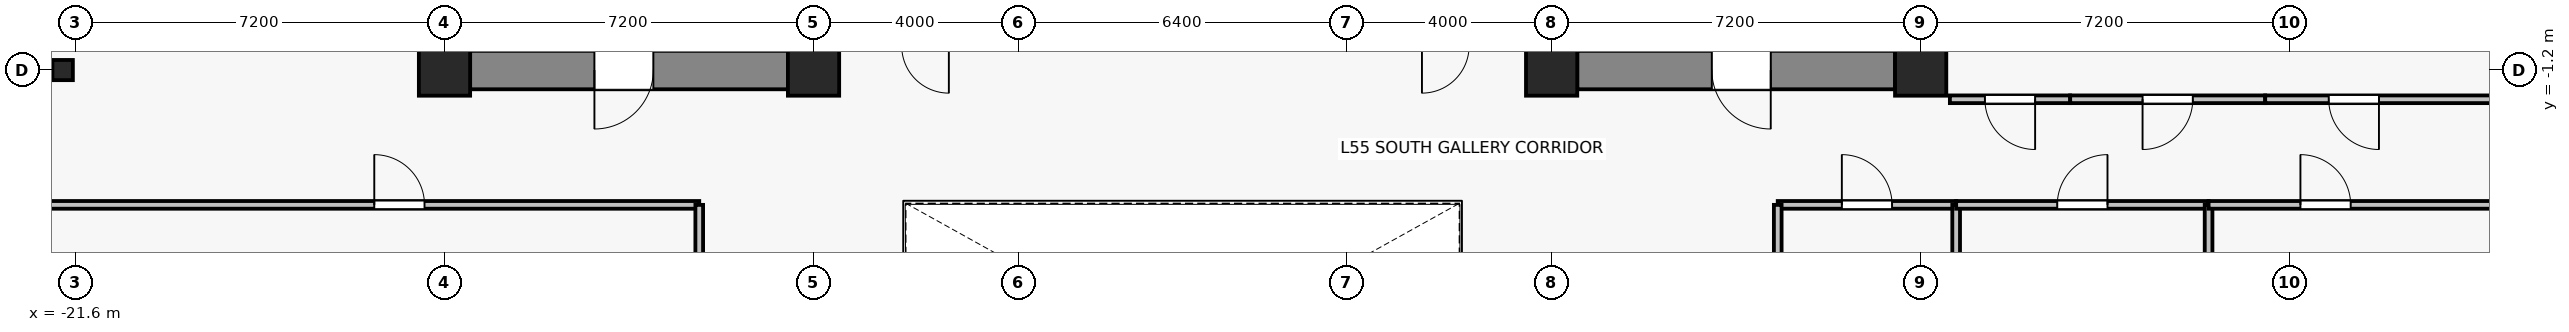
"""IFC4 building model, lengths in metres.
Left out: names, types, materials, properties, quantities, classifications, styles, units other than length and angle.
Written with IfcOpenShell. Run it as: python <this file> out.ifc"""

import sys

from ifc_helpers import new_model, si_unit, direction, frame, frame_2d, origin, origin_2d, place, context, subcontext, project, spatial, rectangle, i_section, extrude, source, transform, mapped, element, fill, save


model = new_model("IFC4")
c1 = context("Model", 3, precision=1e-05, world=origin(), true_north=direction((0.0, 1.0)))
c2 = subcontext(c1, "Body", "Model", "MODEL_VIEW")
j1 = project(units=[si_unit("LENGTHUNIT", "METRE"), si_unit("PLANEANGLEUNIT", "RADIAN")], contexts=[c1])
p1 = place(None, origin())
s1 = spatial("IfcSite", under=j1, at=p1, CompositionType="ELEMENT")
p2 = place(p1, origin())
s2 = spatial("IfcBuilding", under=s1, at=p2, CompositionType="ELEMENT")
p3 = place(p2, frame((0.0, 0.0, 195.7)))
s3 = spatial("IfcBuildingStorey", under=s2, at=p3, CompositionType="ELEMENT", Elevation=195.7)
for number, where, z_axis, x_axis in (
    (1, (-14.4, -1.2, 0.0), (0.0, 0.0, 1.0), (1.0, 0.0, 0.0)),
    (2, (-7.2, -1.2, 0.0), (0.0, 0.0, 1.0), (1.0, 0.0, 0.0)),
    (3, (7.2, -1.2, 0.0), (0.0, 0.0, 1.0), (1.0, 0.0, 0.0)),
    (4, (14.4, -1.2, 0.0), (0.0, 0.0, 1.0), (1.0, 0.0, 0.0)),
):
    element("IfcColumn", number, at=place(p3, frame(where, z_axis=z_axis, x_axis=x_axis)), inside=s3, PredefinedType="COLUMN", context=c2, shape_type="SweptSolid", body=[
        extrude(rectangle(XDim=1.0, YDim=1.0, at=origin_2d()), origin(), (0.0, 0.0, 1.0), 3.3),
    ])
p4 = place(p3, frame((-21.85, -1.2, 0.0), z_axis=(0.0, 0.0, 1.0), x_axis=(1.0, 0.0, 0.0)))
e5 = element("IfcColumn", 5, at=p4, inside=s3, PredefinedType="COLUMN", context=c2, shape_type="SweptSolid", body=[
    extrude(i_section(OverallWidth=0.399, OverallDepth=0.394, WebThickness=0.023, FlangeThickness=0.037, FilletRadius=0.015, at=origin_2d()), origin(), (0.0, 0.0, 1.0), 3.3),
])
p5 = place(p3, frame((-7.7, -1.2, 0.0), z_axis=(0.0, 0.0, 1.0), x_axis=(-1.0, 0.0, 0.0)))
e6 = element("IfcWall", 6, at=p5, inside=s3, PredefinedType="SHEAR", context=c2, shape_type="SweptSolid", body=[
    extrude(rectangle(XDim=6.2, YDim=0.75, at=frame_2d((3.1, 0.0))), origin(), (0.0, 0.0, 1.0), 3.05),
])
p6 = place(p5, frame((2.625, 0.0, 0.0)))
e7 = element("IfcOpeningElement", 7, at=p6, cuts=e6, PredefinedType="OPENING", context=c2, shape_type="SweptSolid", body=[
    extrude(rectangle(XDim=1.15, YDim=2.15, at=frame_2d((0.575, 1.075))), frame((0.0, 0.385, 0.0), z_axis=(0.0, -1.0, 0.0), x_axis=(1.0, 0.0, 0.0)), (0.0, 0.0, 1.0), 0.77),
])
p7 = place(p3, frame((13.9, -1.2, 0.0), z_axis=(0.0, 0.0, 1.0), x_axis=(-1.0, 0.0, 0.0)))
e8 = element("IfcWall", 8, at=p7, inside=s3, PredefinedType="SHEAR", context=c2, shape_type="SweptSolid", body=[
    extrude(rectangle(XDim=6.2, YDim=0.75, at=frame_2d((3.1, 0.0))), origin(), (0.0, 0.0, 1.0), 3.05),
])
p8 = place(p7, frame((2.425, 0.0, 0.0)))
e9 = element("IfcOpeningElement", 9, at=p8, cuts=e8, PredefinedType="OPENING", context=c2, shape_type="SweptSolid", body=[
    extrude(rectangle(XDim=1.15, YDim=2.15, at=frame_2d((0.575, 1.075))), frame((0.0, 0.385, 0.0), z_axis=(0.0, -1.0, 0.0), x_axis=(1.0, 0.0, 0.0)), (0.0, 0.0, 1.0), 0.77),
])
p9 = place(p3, frame((-22.53, -3.83, 0.0), z_axis=(0.0, 0.0, 1.0), x_axis=(1.0, 0.0, 0.0)))
e10 = element("IfcWall", 10, at=p9, inside=s3, PredefinedType="PARTITIONING", context=c2, shape_type="SweptSolid", body=[
    extrude(rectangle(XDim=13.1, YDim=0.15, at=frame_2d((6.55, 0.0))), origin(), (0.0, 0.0, 1.0), 2.54),
])
p10 = place(p9, frame((6.76, 0.0, 0.0)))
e11 = element("IfcOpeningElement", 11, at=p10, cuts=e10, PredefinedType="OPENING", context=c2, shape_type="SweptSolid", body=[
    extrude(rectangle(XDim=0.98, YDim=2.15, at=frame_2d((0.49, 1.075))), frame((0.0, 0.085, 0.0), z_axis=(0.0, -1.0, 0.0), x_axis=(1.0, 0.0, 0.0)), (0.0, 0.0, 1.0), 0.17),
])
p11 = place(p3, frame((-9.43, -3.83, 0.0), z_axis=(0.0, 0.0, 1.0), x_axis=(0.0, -1.0, 0.0)))
e12 = element("IfcWall", 12, at=p11, inside=s3, PredefinedType="PARTITIONING", context=c2, shape_type="SweptSolid", body=[
    extrude(rectangle(XDim=3.39, YDim=0.15, at=frame_2d((1.695, 0.0))), origin(), (0.0, 0.0, 1.0), 2.64),
])
p12 = place(p3, frame((11.611, -3.83, 0.0), z_axis=(0.0, 0.0, 1.0), x_axis=(1.0, 0.0, 0.0)))
e13 = element("IfcWall", 13, at=p12, inside=s3, PredefinedType="PARTITIONING", context=c2, shape_type="SweptSolid", body=[
    extrude(rectangle(XDim=3.481, YDim=0.15, at=frame_2d((1.74, 0.0))), origin(), (0.0, 0.0, 1.0), 2.54),
])
p13 = place(p12, frame((1.25, 0.0, 0.0)))
e14 = element("IfcOpeningElement", 14, at=p13, cuts=e13, PredefinedType="OPENING", context=c2, shape_type="SweptSolid", body=[
    extrude(rectangle(XDim=0.98, YDim=2.15, at=frame_2d((0.49, 1.075))), frame((0.0, 0.085, 0.0), z_axis=(0.0, -1.0, 0.0), x_axis=(1.0, 0.0, 0.0)), (0.0, 0.0, 1.0), 0.17),
])
for number, where, z_axis, x_axis in (
    (15, (11.611, -7.22, 0.0), (0.0, 0.0, 1.0), (0.0, 1.0, 0.0)),
    (16, (15.092, -3.83, 0.0), (0.0, 0.0, 1.0), (0.0, -1.0, 0.0)),
):
    element("IfcWall", number, at=place(p3, frame(where, z_axis=z_axis, x_axis=x_axis)), inside=s3, PredefinedType="PARTITIONING", context=c2, shape_type="SweptSolid", body=[
        extrude(rectangle(XDim=3.39, YDim=0.15, at=frame_2d((1.695, 0.0))), origin(), (0.0, 0.0, 1.0), 2.64),
    ])
p14 = place(p3, frame((15.092, -3.83, 0.0), z_axis=(0.0, 0.0, 1.0), x_axis=(1.0, 0.0, 0.0)))
e17 = element("IfcWall", 17, at=p14, inside=s3, PredefinedType="PARTITIONING", context=c2, shape_type="SweptSolid", body=[
    extrude(rectangle(XDim=4.925, YDim=0.15, at=frame_2d((2.462, 0.0))), origin(), (0.0, 0.0, 1.0), 3.05),
])
p15 = place(p14, frame((1.973, 0.0, 0.0)))
e18 = element("IfcOpeningElement", 18, at=p15, cuts=e17, PredefinedType="OPENING", context=c2, shape_type="SweptSolid", body=[
    extrude(rectangle(XDim=0.98, YDim=2.15, at=frame_2d((0.49, 1.075))), frame((0.0, 0.085, 0.0), z_axis=(0.0, -1.0, 0.0), x_axis=(1.0, 0.0, 0.0)), (0.0, 0.0, 1.0), 0.17),
])
p16 = place(p3, frame((20.017, -3.83, 0.0), z_axis=(0.0, 0.0, 1.0), x_axis=(0.0, -1.0, 0.0)))
e19 = element("IfcWall", 19, at=p16, inside=s3, PredefinedType="PARTITIONING", context=c2, shape_type="SweptSolid", body=[
    extrude(rectangle(XDim=3.39, YDim=0.15, at=frame_2d((1.695, 0.0))), origin(), (0.0, 0.0, 1.0), 2.64),
])
p17 = place(p3, frame((20.017, -3.83, 0.0), z_axis=(0.0, 0.0, 1.0), x_axis=(1.0, 0.0, 0.0)))
e20 = element("IfcWall", 20, at=p17, inside=s3, PredefinedType="PARTITIONING", context=c2, shape_type="SweptSolid", body=[
    extrude(rectangle(XDim=6.513, YDim=0.15, at=frame_2d((3.256, 0.0))), origin(), (0.0, 0.0, 1.0), 2.54),
])
p18 = place(p17, frame((1.792, 0.0, 0.0)))
e21 = element("IfcOpeningElement", 21, at=p18, cuts=e20, PredefinedType="OPENING", context=c2, shape_type="SweptSolid", body=[
    extrude(rectangle(XDim=0.98, YDim=2.15, at=frame_2d((0.49, 1.075))), frame((0.0, 0.085, 0.0), z_axis=(0.0, -1.0, 0.0), x_axis=(1.0, 0.0, 0.0)), (0.0, 0.0, 1.0), 0.17),
])
p19 = place(p3, frame((17.317, -1.77, 0.0), z_axis=(0.0, 0.0, 1.0), x_axis=(-1.0, 0.0, 0.0)))
e22 = element("IfcWall", 22, at=p19, inside=s3, PredefinedType="PARTITIONING", context=c2, shape_type="SweptSolid", body=[
    extrude(rectangle(XDim=2.347, YDim=0.15, at=frame_2d((1.173, 0.0))), origin(), (0.0, 0.0, 1.0), 3.05),
])
p20 = place(p19, frame((0.684, 0.0, 0.0)))
e23 = element("IfcOpeningElement", 23, at=p20, cuts=e22, PredefinedType="OPENING", context=c2, shape_type="SweptSolid", body=[
    extrude(rectangle(XDim=0.98, YDim=2.15, at=frame_2d((0.49, 1.075))), frame((0.0, 0.085, 0.0), z_axis=(0.0, -1.0, 0.0), x_axis=(1.0, 0.0, 0.0)), (0.0, 0.0, 1.0), 0.17),
])
p21 = place(p3, frame((21.122, -1.77, 0.0), z_axis=(0.0, 0.0, 1.0), x_axis=(-1.0, 0.0, 0.0)))
e24 = element("IfcWall", 24, at=p21, inside=s3, PredefinedType="PARTITIONING", context=c2, shape_type="SweptSolid", body=[
    extrude(rectangle(XDim=3.805, YDim=0.15, at=frame_2d((1.902, 0.0))), origin(), (0.0, 0.0, 1.0), 3.05),
])
p22 = place(p21, frame((1.413, 0.0, 0.0)))
e25 = element("IfcOpeningElement", 25, at=p22, cuts=e24, PredefinedType="OPENING", context=c2, shape_type="SweptSolid", body=[
    extrude(rectangle(XDim=0.98, YDim=2.15, at=frame_2d((0.49, 1.075))), frame((0.0, 0.085, 0.0), z_axis=(0.0, -1.0, 0.0), x_axis=(1.0, 0.0, 0.0)), (0.0, 0.0, 1.0), 0.17),
])
p23 = place(p3, frame((26.53, -1.77, 0.0), z_axis=(0.0, 0.0, 1.0), x_axis=(-1.0, 0.0, 0.0)))
e26 = element("IfcWall", 26, at=p23, inside=s3, PredefinedType="PARTITIONING", context=c2, shape_type="SweptSolid", body=[
    extrude(rectangle(XDim=5.408, YDim=0.15, at=frame_2d((2.704, 0.0))), origin(), (0.0, 0.0, 1.0), 2.54),
])
p24 = place(p23, frame((3.189, 0.0, 0.0)))
e27 = element("IfcOpeningElement", 27, at=p24, cuts=e26, PredefinedType="OPENING", context=c2, shape_type="SweptSolid", body=[
    extrude(rectangle(XDim=0.98, YDim=2.15, at=frame_2d((0.49, 1.075))), frame((0.0, 0.085, 0.0), z_axis=(0.0, -1.0, 0.0), x_axis=(1.0, 0.0, 0.0)), (0.0, 0.0, 1.0), 0.17),
])
m1 = source(origin(), c2, "Body", "SweptSolid", [
    extrude(rectangle(XDim=1.15, YDim=2.15, at=frame_2d((0.575, 1.075))), frame((0.0, 0.025, 0.0), z_axis=(0.0, -1.0, 0.0), x_axis=(1.0, 0.0, 0.0)), (0.0, 0.0, 1.0), 0.05),
])
p25 = place(p6, origin())
e28 = element("IfcDoor", 28, at=p25, inside=s3, OperationType="SINGLE_SWING_RIGHT", PredefinedType="DOOR", context=c2, shape_type="MappedRepresentation", body=[
    mapped(m1, transform((0.0, 0.0, 0.0), x_axis=(1.0, 0.0, 0.0), y_axis=(0.0, 1.0, 0.0), z_axis=(0.0, 0.0, 1.0), scale=1.0)),
])
fill(e7, e28)
p26 = place(p8, origin())
e29 = element("IfcDoor", 29, at=p26, inside=s3, OperationType="SINGLE_SWING_LEFT", PredefinedType="DOOR", context=c2, shape_type="MappedRepresentation", body=[
    mapped(m1, transform((0.0, 0.0, 0.0), x_axis=(1.0, 0.0, 0.0), y_axis=(0.0, 1.0, 0.0), z_axis=(0.0, 0.0, 1.0), scale=1.0)),
])
fill(e9, e29)
m2 = source(origin(), c2, "Body", "SweptSolid", [
    extrude(rectangle(XDim=0.98, YDim=2.15, at=frame_2d((0.49, 1.075))), frame((0.0, 0.025, 0.0), z_axis=(0.0, -1.0, 0.0), x_axis=(1.0, 0.0, 0.0)), (0.0, 0.0, 1.0), 0.05),
])
p27 = place(p10, origin())
e30 = element("IfcDoor", 30, at=p27, inside=s3, OperationType="SINGLE_SWING_LEFT", PredefinedType="DOOR", context=c2, shape_type="MappedRepresentation", body=[
    mapped(m2, transform((0.0, 0.0, 0.0), x_axis=(1.0, 0.0, 0.0), y_axis=(0.0, 1.0, 0.0), z_axis=(0.0, 0.0, 1.0), scale=1.0)),
])
fill(e11, e30)
p28 = place(p13, origin())
e31 = element("IfcDoor", 31, at=p28, inside=s3, OperationType="SINGLE_SWING_LEFT", PredefinedType="DOOR", context=c2, shape_type="MappedRepresentation", body=[
    mapped(m2, transform((0.0, 0.0, 0.0), x_axis=(1.0, 0.0, 0.0), y_axis=(0.0, 1.0, 0.0), z_axis=(0.0, 0.0, 1.0), scale=1.0)),
])
fill(e14, e31)
p29 = place(p15, origin())
e32 = element("IfcDoor", 32, at=p29, inside=s3, OperationType="SINGLE_SWING_RIGHT", PredefinedType="DOOR", context=c2, shape_type="MappedRepresentation", body=[
    mapped(m2, transform((0.0, 0.0, 0.0), x_axis=(1.0, 0.0, 0.0), y_axis=(0.0, 1.0, 0.0), z_axis=(0.0, 0.0, 1.0), scale=1.0)),
])
fill(e18, e32)
p30 = place(p18, origin())
e33 = element("IfcDoor", 33, at=p30, inside=s3, OperationType="SINGLE_SWING_LEFT", PredefinedType="DOOR", context=c2, shape_type="MappedRepresentation", body=[
    mapped(m2, transform((0.0, 0.0, 0.0), x_axis=(1.0, 0.0, 0.0), y_axis=(0.0, 1.0, 0.0), z_axis=(0.0, 0.0, 1.0), scale=1.0)),
])
fill(e21, e33)
p31 = place(p20, origin())
e34 = element("IfcDoor", 34, at=p31, inside=s3, OperationType="SINGLE_SWING_LEFT", PredefinedType="DOOR", context=c2, shape_type="MappedRepresentation", body=[
    mapped(m2, transform((0.0, 0.0, 0.0), x_axis=(1.0, 0.0, 0.0), y_axis=(0.0, 1.0, 0.0), z_axis=(0.0, 0.0, 1.0), scale=1.0)),
])
fill(e23, e34)
p32 = place(p22, origin())
e35 = element("IfcDoor", 35, at=p32, inside=s3, OperationType="SINGLE_SWING_RIGHT", PredefinedType="DOOR", context=c2, shape_type="MappedRepresentation", body=[
    mapped(m2, transform((0.0, 0.0, 0.0), x_axis=(1.0, 0.0, 0.0), y_axis=(0.0, 1.0, 0.0), z_axis=(0.0, 0.0, 1.0), scale=1.0)),
])
fill(e25, e35)
p33 = place(p24, origin())
e36 = element("IfcDoor", 36, at=p33, inside=s3, OperationType="SINGLE_SWING_LEFT", PredefinedType="DOOR", context=c2, shape_type="MappedRepresentation", body=[
    mapped(m2, transform((0.0, 0.0, 0.0), x_axis=(1.0, 0.0, 0.0), y_axis=(0.0, 1.0, 0.0), z_axis=(0.0, 0.0, 1.0), scale=1.0)),
])
fill(e27, e36)
save(model, sys.argv[1])
